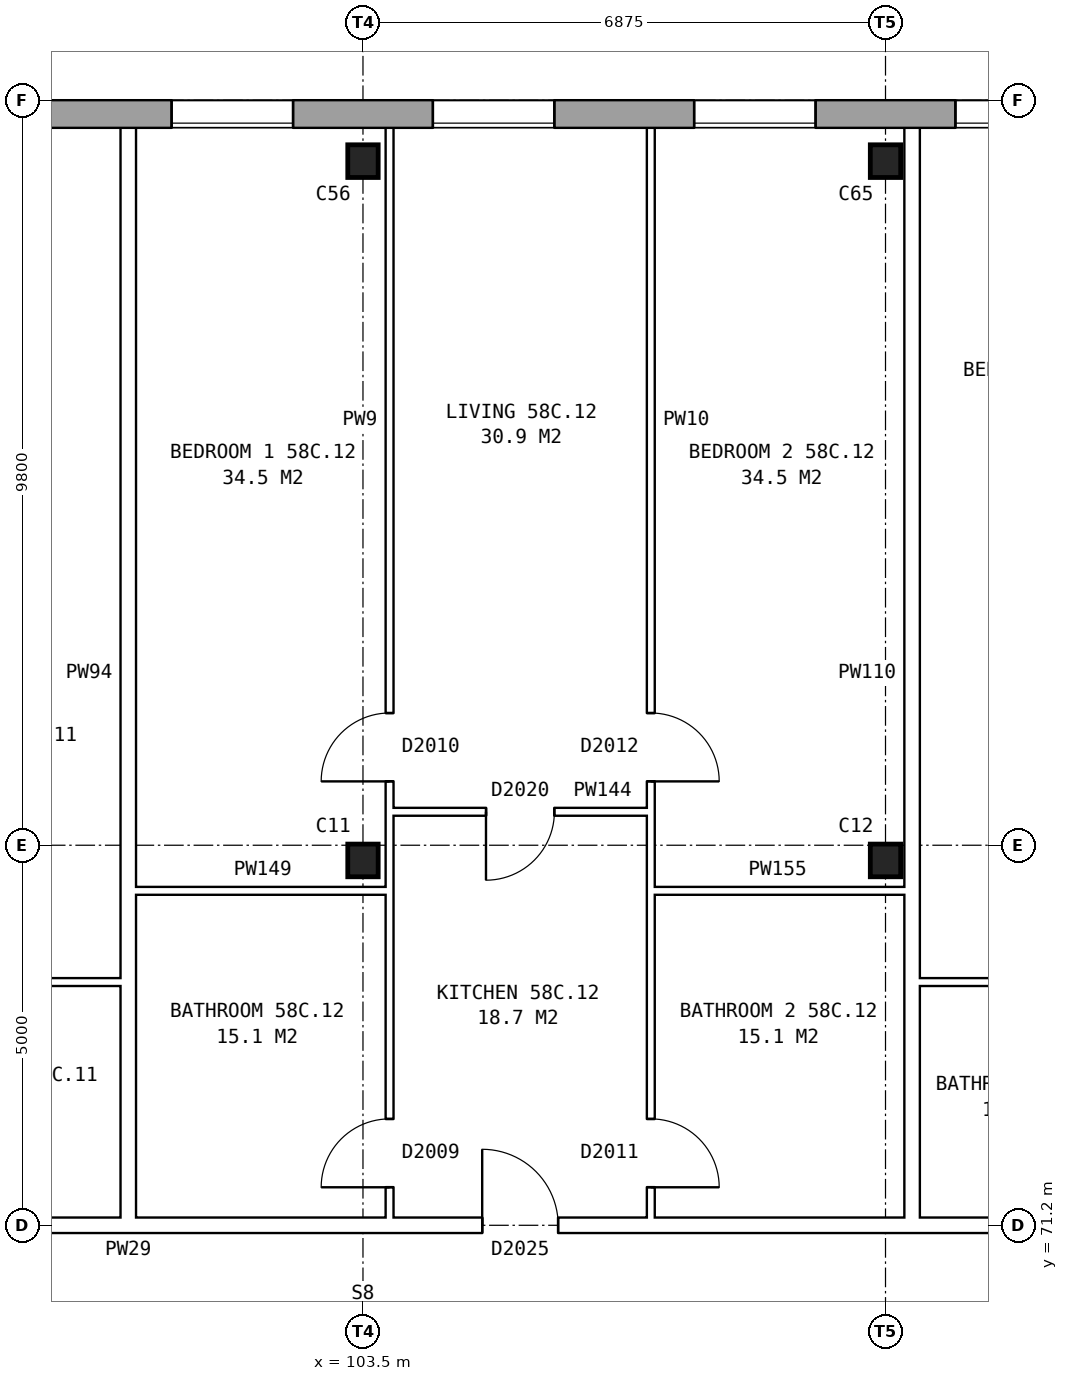
"""IFC4 building model, lengths in metres.
Left out: names, types, materials, properties, quantities, classifications, styles, units other than length and angle.
Written with IfcOpenShell. Run it as: python <this file> out.ifc"""

import sys

from ifc_helpers import new_model, si_unit, direction, frame, frame_2d, origin, origin_2d, place, context, subcontext, project, spatial, rectangle, i_section, extrude, element, fill, save


model = new_model("IFC4")
c1 = context("Model", 3, precision=1e-05, world=origin(), true_north=direction((0.0, 1.0)))
c2 = subcontext(c1, "Body", "Model", "MODEL_VIEW")
j1 = project(units=[si_unit("LENGTHUNIT", "METRE"), si_unit("PLANEANGLEUNIT", "RADIAN")], contexts=[c1])
p1 = place(None, origin())
s1 = spatial("IfcSite", under=j1, at=p1, CompositionType="ELEMENT")
p2 = place(p1, origin())
s2 = spatial("IfcBuilding", under=s1, at=p2, CompositionType="ELEMENT")
p3 = place(p2, frame((0.0, 0.0, 205.9)))
s3 = spatial("IfcBuildingStorey", under=s2, at=p3, CompositionType="ELEMENT", Elevation=205.9)
for number, where, z_axis, x_axis in (
    (1, (103.5, 76.0, 0.0), (0.0, 0.0, 1.0), (1.0, 0.0, 0.0)),
    (2, (110.375, 76.0, 0.0), (0.0, 0.0, 1.0), (1.0, 0.0, 0.0)),
    (3, (103.5, 85.2, 0.0), (0.0, 0.0, 1.0), (1.0, 0.0, 0.0)),
    (4, (110.375, 85.2, 0.0), (0.0, 0.0, 1.0), (1.0, 0.0, 0.0)),
):
    element("IfcColumn", number, at=place(p3, frame(where, z_axis=z_axis, x_axis=x_axis)), inside=s3, PredefinedType="COLUMN", context=c2, shape_type="SweptSolid", body=[
        extrude(i_section(OverallWidth=0.4, OverallDepth=0.43, WebThickness=0.04, FlangeThickness=0.04, at=origin_2d()), origin(), (0.0, 0.0, 1.0), 2.85),
    ])
p4 = place(p3, frame((131.05, 85.82, 0.0), z_axis=(0.0, 0.0, 1.0), x_axis=(-1.0, 0.0, 0.0)))
e5 = element("IfcWall", 5, at=p4, inside=s3, PredefinedType="STANDARD", context=c2, shape_type="SweptSolid", body=[
    extrude(rectangle(XDim=55.1, YDim=0.36, at=frame_2d((27.55, 0.0))), origin(), (0.0, 0.0, 1.0), 2.85),
])
p5 = place(p4, frame((0.969, 0.0, 0.8)))
e6 = element("IfcOpeningElement", 6, at=p5, cuts=e5, PredefinedType="OPENING", context=c2, shape_type="SweptSolid", body=[
    extrude(rectangle(XDim=1.6, YDim=1.8, at=frame_2d((0.8, 0.9))), frame((0.0, 0.19, 0.0), z_axis=(0.0, -1.0, 0.0), x_axis=(1.0, 0.0, 0.0)), (0.0, 0.0, 1.0), 0.38),
])
p6 = place(p4, frame((4.406, 0.0, 0.8)))
e7 = element("IfcOpeningElement", 7, at=p6, cuts=e5, PredefinedType="OPENING", context=c2, shape_type="SweptSolid", body=[
    extrude(rectangle(XDim=1.6, YDim=1.8, at=frame_2d((0.8, 0.9))), frame((0.0, 0.19, 0.0), z_axis=(0.0, -1.0, 0.0), x_axis=(1.0, 0.0, 0.0)), (0.0, 0.0, 1.0), 0.38),
])
p7 = place(p4, frame((7.844, 0.0, 0.8)))
e8 = element("IfcOpeningElement", 8, at=p7, cuts=e5, PredefinedType="OPENING", context=c2, shape_type="SweptSolid", body=[
    extrude(rectangle(XDim=1.6, YDim=1.8, at=frame_2d((0.8, 0.9))), frame((0.0, 0.19, 0.0), z_axis=(0.0, -1.0, 0.0), x_axis=(1.0, 0.0, 0.0)), (0.0, 0.0, 1.0), 0.38),
])
p8 = place(p4, frame((11.281, 0.0, 0.8)))
e9 = element("IfcOpeningElement", 9, at=p8, cuts=e5, PredefinedType="OPENING", context=c2, shape_type="SweptSolid", body=[
    extrude(rectangle(XDim=1.6, YDim=1.8, at=frame_2d((0.8, 0.9))), frame((0.0, 0.19, 0.0), z_axis=(0.0, -1.0, 0.0), x_axis=(1.0, 0.0, 0.0)), (0.0, 0.0, 1.0), 0.38),
])
p9 = place(p4, frame((14.719, 0.0, 0.8)))
e10 = element("IfcOpeningElement", 10, at=p9, cuts=e5, PredefinedType="OPENING", context=c2, shape_type="SweptSolid", body=[
    extrude(rectangle(XDim=1.6, YDim=1.8, at=frame_2d((0.8, 0.9))), frame((0.0, 0.19, 0.0), z_axis=(0.0, -1.0, 0.0), x_axis=(1.0, 0.0, 0.0)), (0.0, 0.0, 1.0), 0.38),
])
p10 = place(p4, frame((18.156, 0.0, 0.8)))
e11 = element("IfcOpeningElement", 11, at=p10, cuts=e5, PredefinedType="OPENING", context=c2, shape_type="SweptSolid", body=[
    extrude(rectangle(XDim=1.6, YDim=1.8, at=frame_2d((0.8, 0.9))), frame((0.0, 0.19, 0.0), z_axis=(0.0, -1.0, 0.0), x_axis=(1.0, 0.0, 0.0)), (0.0, 0.0, 1.0), 0.38),
])
p11 = place(p4, frame((21.594, 0.0, 0.8)))
e12 = element("IfcOpeningElement", 12, at=p11, cuts=e5, PredefinedType="OPENING", context=c2, shape_type="SweptSolid", body=[
    extrude(rectangle(XDim=1.6, YDim=1.8, at=frame_2d((0.8, 0.9))), frame((0.0, 0.19, 0.0), z_axis=(0.0, -1.0, 0.0), x_axis=(1.0, 0.0, 0.0)), (0.0, 0.0, 1.0), 0.38),
])
p12 = place(p4, frame((25.031, 0.0, 0.8)))
e13 = element("IfcOpeningElement", 13, at=p12, cuts=e5, PredefinedType="OPENING", context=c2, shape_type="SweptSolid", body=[
    extrude(rectangle(XDim=1.6, YDim=1.8, at=frame_2d((0.8, 0.9))), frame((0.0, 0.19, 0.0), z_axis=(0.0, -1.0, 0.0), x_axis=(1.0, 0.0, 0.0)), (0.0, 0.0, 1.0), 0.38),
])
p13 = place(p4, frame((28.469, 0.0, 0.8)))
e14 = element("IfcOpeningElement", 14, at=p13, cuts=e5, PredefinedType="OPENING", context=c2, shape_type="SweptSolid", body=[
    extrude(rectangle(XDim=1.6, YDim=1.8, at=frame_2d((0.8, 0.9))), frame((0.0, 0.19, 0.0), z_axis=(0.0, -1.0, 0.0), x_axis=(1.0, 0.0, 0.0)), (0.0, 0.0, 1.0), 0.38),
])
p14 = place(p4, frame((31.906, 0.0, 0.8)))
e15 = element("IfcOpeningElement", 15, at=p14, cuts=e5, PredefinedType="OPENING", context=c2, shape_type="SweptSolid", body=[
    extrude(rectangle(XDim=1.6, YDim=1.8, at=frame_2d((0.8, 0.9))), frame((0.0, 0.19, 0.0), z_axis=(0.0, -1.0, 0.0), x_axis=(1.0, 0.0, 0.0)), (0.0, 0.0, 1.0), 0.38),
])
p15 = place(p4, frame((35.344, 0.0, 0.8)))
e16 = element("IfcOpeningElement", 16, at=p15, cuts=e5, PredefinedType="OPENING", context=c2, shape_type="SweptSolid", body=[
    extrude(rectangle(XDim=1.6, YDim=1.8, at=frame_2d((0.8, 0.9))), frame((0.0, 0.19, 0.0), z_axis=(0.0, -1.0, 0.0), x_axis=(1.0, 0.0, 0.0)), (0.0, 0.0, 1.0), 0.38),
])
p16 = place(p4, frame((38.781, 0.0, 0.8)))
e17 = element("IfcOpeningElement", 17, at=p16, cuts=e5, PredefinedType="OPENING", context=c2, shape_type="SweptSolid", body=[
    extrude(rectangle(XDim=1.6, YDim=1.8, at=frame_2d((0.8, 0.9))), frame((0.0, 0.19, 0.0), z_axis=(0.0, -1.0, 0.0), x_axis=(1.0, 0.0, 0.0)), (0.0, 0.0, 1.0), 0.38),
])
p17 = place(p4, frame((42.219, 0.0, 0.8)))
e18 = element("IfcOpeningElement", 18, at=p17, cuts=e5, PredefinedType="OPENING", context=c2, shape_type="SweptSolid", body=[
    extrude(rectangle(XDim=1.6, YDim=1.8, at=frame_2d((0.8, 0.9))), frame((0.0, 0.19, 0.0), z_axis=(0.0, -1.0, 0.0), x_axis=(1.0, 0.0, 0.0)), (0.0, 0.0, 1.0), 0.38),
])
p18 = place(p4, frame((45.656, 0.0, 0.8)))
e19 = element("IfcOpeningElement", 19, at=p18, cuts=e5, PredefinedType="OPENING", context=c2, shape_type="SweptSolid", body=[
    extrude(rectangle(XDim=1.6, YDim=1.8, at=frame_2d((0.8, 0.9))), frame((0.0, 0.19, 0.0), z_axis=(0.0, -1.0, 0.0), x_axis=(1.0, 0.0, 0.0)), (0.0, 0.0, 1.0), 0.38),
])
p19 = place(p4, frame((49.094, 0.0, 0.8)))
e20 = element("IfcOpeningElement", 20, at=p19, cuts=e5, PredefinedType="OPENING", context=c2, shape_type="SweptSolid", body=[
    extrude(rectangle(XDim=1.6, YDim=1.8, at=frame_2d((0.8, 0.9))), frame((0.0, 0.19, 0.0), z_axis=(0.0, -1.0, 0.0), x_axis=(1.0, 0.0, 0.0)), (0.0, 0.0, 1.0), 0.38),
])
p20 = place(p4, frame((52.531, 0.0, 0.8)))
e21 = element("IfcOpeningElement", 21, at=p20, cuts=e5, PredefinedType="OPENING", context=c2, shape_type="SweptSolid", body=[
    extrude(rectangle(XDim=1.6, YDim=1.8, at=frame_2d((0.8, 0.9))), frame((0.0, 0.19, 0.0), z_axis=(0.0, -1.0, 0.0), x_axis=(1.0, 0.0, 0.0)), (0.0, 0.0, 1.0), 0.38),
])
p21 = place(p3, frame((83.225, 71.2, 0.0), z_axis=(0.0, 0.0, 1.0), x_axis=(1.0, 0.0, 0.0)))
e22 = element("IfcWall", 22, at=p21, inside=s3, PredefinedType="PARTITIONING", context=c2, shape_type="SweptSolid", body=[
    extrude(rectangle(XDim=41.25, YDim=0.2, at=frame_2d((20.625, 0.0))), origin(), (0.0, 0.0, 1.0), 2.85),
])
p22 = place(p21, frame((4.656, 0.0, 0.0)))
e23 = element("IfcOpeningElement", 23, at=p22, cuts=e22, PredefinedType="OPENING", context=c2, shape_type="SweptSolid", body=[
    extrude(rectangle(XDim=1.0, YDim=2.1, at=frame_2d((0.5, 1.05))), frame((0.0, 0.11, 0.0), z_axis=(0.0, -1.0, 0.0), x_axis=(1.0, 0.0, 0.0)), (0.0, 0.0, 1.0), 0.22),
])
p23 = place(p21, frame((11.531, 0.0, 0.0)))
e24 = element("IfcOpeningElement", 24, at=p23, cuts=e22, PredefinedType="OPENING", context=c2, shape_type="SweptSolid", body=[
    extrude(rectangle(XDim=1.0, YDim=2.1, at=frame_2d((0.5, 1.05))), frame((0.0, 0.11, 0.0), z_axis=(0.0, -1.0, 0.0), x_axis=(1.0, 0.0, 0.0)), (0.0, 0.0, 1.0), 0.22),
])
p24 = place(p21, frame((21.844, 0.0, 0.0)))
e25 = element("IfcOpeningElement", 25, at=p24, cuts=e22, PredefinedType="OPENING", context=c2, shape_type="SweptSolid", body=[
    extrude(rectangle(XDim=1.0, YDim=2.1, at=frame_2d((0.5, 1.05))), frame((0.0, 0.11, 0.0), z_axis=(0.0, -1.0, 0.0), x_axis=(1.0, 0.0, 0.0)), (0.0, 0.0, 1.0), 0.22),
])
p25 = place(p21, frame((32.156, 0.0, 0.0)))
e26 = element("IfcOpeningElement", 26, at=p25, cuts=e22, PredefinedType="OPENING", context=c2, shape_type="SweptSolid", body=[
    extrude(rectangle(XDim=1.0, YDim=2.1, at=frame_2d((0.5, 1.05))), frame((0.0, 0.11, 0.0), z_axis=(0.0, -1.0, 0.0), x_axis=(1.0, 0.0, 0.0)), (0.0, 0.0, 1.0), 0.22),
])
p26 = place(p21, frame((35.594, 0.0, 0.0)))
e27 = element("IfcOpeningElement", 27, at=p26, cuts=e22, PredefinedType="OPENING", context=c2, shape_type="SweptSolid", body=[
    extrude(rectangle(XDim=1.0, YDim=2.1, at=frame_2d((0.5, 1.05))), frame((0.0, 0.11, 0.0), z_axis=(0.0, -1.0, 0.0), x_axis=(1.0, 0.0, 0.0)), (0.0, 0.0, 1.0), 0.22),
])
p27 = place(p3, frame((96.975, 74.4, 0.0), z_axis=(0.0, 0.0, 1.0), x_axis=(1.0, 0.0, 0.0)))
e28 = element("IfcWall", 28, at=p27, inside=s3, PredefinedType="PARTITIONING", context=c2, shape_type="SweptSolid", body=[
    extrude(rectangle(XDim=3.337, YDim=0.1, at=frame_2d((1.668, 0.0))), origin(), (0.0, 0.0, 1.0), 2.85),
])
p28 = place(p3, frame((110.825, 74.4, 0.0), z_axis=(0.0, 0.0, 1.0), x_axis=(1.0, 0.0, 0.0)))
e29 = element("IfcWall", 29, at=p28, inside=s3, PredefinedType="PARTITIONING", context=c2, shape_type="SweptSolid", body=[
    extrude(rectangle(XDim=3.337, YDim=0.1, at=frame_2d((1.668, 0.0))), origin(), (0.0, 0.0, 1.0), 2.85),
])
p29 = place(p3, frame((100.512, 75.6, 0.0), z_axis=(0.0, 0.0, 1.0), x_axis=(1.0, 0.0, 0.0)))
e30 = element("IfcWall", 30, at=p29, inside=s3, PredefinedType="PARTITIONING", context=c2, shape_type="SweptSolid", body=[
    extrude(rectangle(XDim=3.338, YDim=0.1, at=frame_2d((1.669, 0.0))), origin(), (0.0, 0.0, 1.0), 2.85),
])
p30 = place(p3, frame((107.287, 75.6, 0.0), z_axis=(0.0, 0.0, 1.0), x_axis=(1.0, 0.0, 0.0)))
e31 = element("IfcWall", 31, at=p30, inside=s3, PredefinedType="PARTITIONING", context=c2, shape_type="SweptSolid", body=[
    extrude(rectangle(XDim=3.338, YDim=0.1, at=frame_2d((1.669, 0.0))), origin(), (0.0, 0.0, 1.0), 2.85),
])
p31 = place(p3, frame((103.85, 76.64, 0.0), z_axis=(0.0, 0.0, 1.0), x_axis=(1.0, 0.0, 0.0)))
e32 = element("IfcWall", 32, at=p31, inside=s3, PredefinedType="PARTITIONING", context=c2, shape_type="SweptSolid", body=[
    extrude(rectangle(XDim=3.437, YDim=0.1, at=frame_2d((1.719, 0.0))), origin(), (0.0, 0.0, 1.0), 2.85),
])
p32 = place(p31, frame((1.269, 0.0, 0.0)))
e33 = element("IfcOpeningElement", 33, at=p32, cuts=e32, PredefinedType="OPENING", context=c2, shape_type="SweptSolid", body=[
    extrude(rectangle(XDim=0.9, YDim=2.1, at=frame_2d((0.45, 1.05))), frame((0.0, 0.06, 0.0), z_axis=(0.0, -1.0, 0.0), x_axis=(1.0, 0.0, 0.0)), (0.0, 0.0, 1.0), 0.12),
])
p33 = place(p3, frame((100.412, 71.3, 0.0), z_axis=(0.0, 0.0, 1.0), x_axis=(0.0, 1.0, 0.0)))
e34 = element("IfcWall", 34, at=p33, inside=s3, PredefinedType="PARTITIONING", context=c2, shape_type="SweptSolid", body=[
    extrude(rectangle(XDim=14.34, YDim=0.2, at=frame_2d((7.17, 0.0))), origin(), (0.0, 0.0, 1.0), 2.85),
])
p34 = place(p3, frame((103.85, 71.3, 0.0), z_axis=(0.0, 0.0, 1.0), x_axis=(0.0, 1.0, 0.0)))
e35 = element("IfcWall", 35, at=p34, inside=s3, PredefinedType="PARTITIONING", context=c2, shape_type="SweptSolid", body=[
    extrude(rectangle(XDim=14.34, YDim=0.1, at=frame_2d((7.17, 0.0))), origin(), (0.0, 0.0, 1.0), 2.85),
])
p35 = place(p34, frame((5.74, 0.0, 0.0)))
e36 = element("IfcOpeningElement", 36, at=p35, cuts=e35, PredefinedType="OPENING", context=c2, shape_type="SweptSolid", body=[
    extrude(rectangle(XDim=0.9, YDim=2.1, at=frame_2d((0.45, 1.05))), frame((0.0, 0.06, 0.0), z_axis=(0.0, -1.0, 0.0), x_axis=(1.0, 0.0, 0.0)), (0.0, 0.0, 1.0), 0.12),
])
p36 = place(p34, frame((0.4, 0.0, 0.0)))
e37 = element("IfcOpeningElement", 37, at=p36, cuts=e35, PredefinedType="OPENING", context=c2, shape_type="SweptSolid", body=[
    extrude(rectangle(XDim=0.9, YDim=2.1, at=frame_2d((0.45, 1.05))), frame((0.0, 0.06, 0.0), z_axis=(0.0, -1.0, 0.0), x_axis=(1.0, 0.0, 0.0)), (0.0, 0.0, 1.0), 0.12),
])
p37 = place(p3, frame((107.287, 71.3, 0.0), z_axis=(0.0, 0.0, 1.0), x_axis=(0.0, 1.0, 0.0)))
e38 = element("IfcWall", 38, at=p37, inside=s3, PredefinedType="PARTITIONING", context=c2, shape_type="SweptSolid", body=[
    extrude(rectangle(XDim=14.34, YDim=0.1, at=frame_2d((7.17, 0.0))), origin(), (0.0, 0.0, 1.0), 2.85),
])
p38 = place(p37, frame((5.74, 0.0, 0.0)))
e39 = element("IfcOpeningElement", 39, at=p38, cuts=e38, PredefinedType="OPENING", context=c2, shape_type="SweptSolid", body=[
    extrude(rectangle(XDim=0.9, YDim=2.1, at=frame_2d((0.45, 1.05))), frame((0.0, 0.06, 0.0), z_axis=(0.0, -1.0, 0.0), x_axis=(1.0, 0.0, 0.0)), (0.0, 0.0, 1.0), 0.12),
])
p39 = place(p37, frame((0.4, 0.0, 0.0)))
e40 = element("IfcOpeningElement", 40, at=p39, cuts=e38, PredefinedType="OPENING", context=c2, shape_type="SweptSolid", body=[
    extrude(rectangle(XDim=0.9, YDim=2.1, at=frame_2d((0.45, 1.05))), frame((0.0, 0.06, 0.0), z_axis=(0.0, -1.0, 0.0), x_axis=(1.0, 0.0, 0.0)), (0.0, 0.0, 1.0), 0.12),
])
p40 = place(p3, frame((110.725, 71.3, 0.0), z_axis=(0.0, 0.0, 1.0), x_axis=(0.0, 1.0, 0.0)))
e41 = element("IfcWall", 41, at=p40, inside=s3, PredefinedType="PARTITIONING", context=c2, shape_type="SweptSolid", body=[
    extrude(rectangle(XDim=14.34, YDim=0.2, at=frame_2d((7.17, 0.0))), origin(), (0.0, 0.0, 1.0), 2.85),
])
p41 = place(p10, origin())
e42 = element("IfcWindow", 42, at=p41, inside=s3, PartitioningType="SINGLE_PANEL", PredefinedType="WINDOW", context=c2, shape_type="SweptSolid", body=[
    extrude(rectangle(XDim=1.6, YDim=1.8, at=frame_2d((0.8, 0.9))), frame((0.0, 0.15, 0.0), z_axis=(0.0, -1.0, 0.0), x_axis=(1.0, 0.0, 0.0)), (0.0, 0.0, 1.0), 0.06),
])
fill(e11, e42)
p42 = place(p11, origin())
e43 = element("IfcWindow", 43, at=p42, inside=s3, PartitioningType="SINGLE_PANEL", PredefinedType="WINDOW", context=c2, shape_type="SweptSolid", body=[
    extrude(rectangle(XDim=1.6, YDim=1.8, at=frame_2d((0.8, 0.9))), frame((0.0, 0.15, 0.0), z_axis=(0.0, -1.0, 0.0), x_axis=(1.0, 0.0, 0.0)), (0.0, 0.0, 1.0), 0.06),
])
fill(e12, e43)
p43 = place(p12, origin())
e44 = element("IfcWindow", 44, at=p43, inside=s3, PartitioningType="SINGLE_PANEL", PredefinedType="WINDOW", context=c2, shape_type="SweptSolid", body=[
    extrude(rectangle(XDim=1.6, YDim=1.8, at=frame_2d((0.8, 0.9))), frame((0.0, 0.15, 0.0), z_axis=(0.0, -1.0, 0.0), x_axis=(1.0, 0.0, 0.0)), (0.0, 0.0, 1.0), 0.06),
])
fill(e13, e44)
p44 = place(p13, origin())
e45 = element("IfcWindow", 45, at=p44, inside=s3, PartitioningType="SINGLE_PANEL", PredefinedType="WINDOW", context=c2, shape_type="SweptSolid", body=[
    extrude(rectangle(XDim=1.6, YDim=1.8, at=frame_2d((0.8, 0.9))), frame((0.0, 0.15, 0.0), z_axis=(0.0, -1.0, 0.0), x_axis=(1.0, 0.0, 0.0)), (0.0, 0.0, 1.0), 0.06),
])
fill(e14, e45)
p45 = place(p35, origin())
e46 = element("IfcDoor", 46, at=p45, inside=s3, OperationType="SINGLE_SWING_LEFT", PredefinedType="DOOR", context=c2, shape_type="SweptSolid", body=[
    extrude(rectangle(XDim=0.9, YDim=2.1, at=frame_2d((0.45, 1.05))), frame((0.0, 0.025, 0.0), z_axis=(0.0, -1.0, 0.0), x_axis=(1.0, 0.0, 0.0)), (0.0, 0.0, 1.0), 0.05),
])
fill(e36, e46)
p46 = place(p38, frame((0.9, 0.0, 0.0), z_axis=(0.0, 0.0, 1.0), x_axis=(-1.0, 0.0, 0.0)))
e47 = element("IfcDoor", 47, at=p46, inside=s3, OperationType="SINGLE_SWING_RIGHT", PredefinedType="DOOR", context=c2, shape_type="SweptSolid", body=[
    extrude(rectangle(XDim=0.9, YDim=2.1, at=frame_2d((0.45, 1.05))), frame((0.0, 0.025, 0.0), z_axis=(0.0, -1.0, 0.0), x_axis=(1.0, 0.0, 0.0)), (0.0, 0.0, 1.0), 0.05),
])
fill(e39, e47)
p47 = place(p24, origin())
e48 = element("IfcDoor", 48, at=p47, inside=s3, OperationType="SINGLE_SWING_LEFT", PredefinedType="DOOR", context=c2, shape_type="SweptSolid", body=[
    extrude(rectangle(XDim=1.0, YDim=2.1, at=frame_2d((0.5, 1.05))), frame((0.0, 0.025, 0.0), z_axis=(0.0, -1.0, 0.0), x_axis=(1.0, 0.0, 0.0)), (0.0, 0.0, 1.0), 0.05),
])
fill(e25, e48)
p48 = place(p32, frame((0.9, 0.0, 0.0), z_axis=(0.0, 0.0, 1.0), x_axis=(-1.0, 0.0, 0.0)))
e49 = element("IfcDoor", 49, at=p48, inside=s3, OperationType="SINGLE_SWING_RIGHT", PredefinedType="DOOR", context=c2, shape_type="SweptSolid", body=[
    extrude(rectangle(XDim=0.9, YDim=2.1, at=frame_2d((0.45, 1.05))), frame((0.0, 0.025, 0.0), z_axis=(0.0, -1.0, 0.0), x_axis=(1.0, 0.0, 0.0)), (0.0, 0.0, 1.0), 0.05),
])
fill(e33, e49)
p49 = place(p36, origin())
e50 = element("IfcDoor", 50, at=p49, inside=s3, OperationType="SINGLE_SWING_LEFT", PredefinedType="DOOR", context=c2, shape_type="SweptSolid", body=[
    extrude(rectangle(XDim=0.9, YDim=2.1, at=frame_2d((0.45, 1.05))), frame((0.0, 0.025, 0.0), z_axis=(0.0, -1.0, 0.0), x_axis=(1.0, 0.0, 0.0)), (0.0, 0.0, 1.0), 0.05),
])
fill(e37, e50)
p50 = place(p39, frame((0.9, 0.0, 0.0), z_axis=(0.0, 0.0, 1.0), x_axis=(-1.0, 0.0, 0.0)))
e51 = element("IfcDoor", 51, at=p50, inside=s3, OperationType="SINGLE_SWING_RIGHT", PredefinedType="DOOR", context=c2, shape_type="SweptSolid", body=[
    extrude(rectangle(XDim=0.9, YDim=2.1, at=frame_2d((0.45, 1.05))), frame((0.0, 0.025, 0.0), z_axis=(0.0, -1.0, 0.0), x_axis=(1.0, 0.0, 0.0)), (0.0, 0.0, 1.0), 0.05),
])
fill(e40, e51)
save(model, sys.argv[1])
